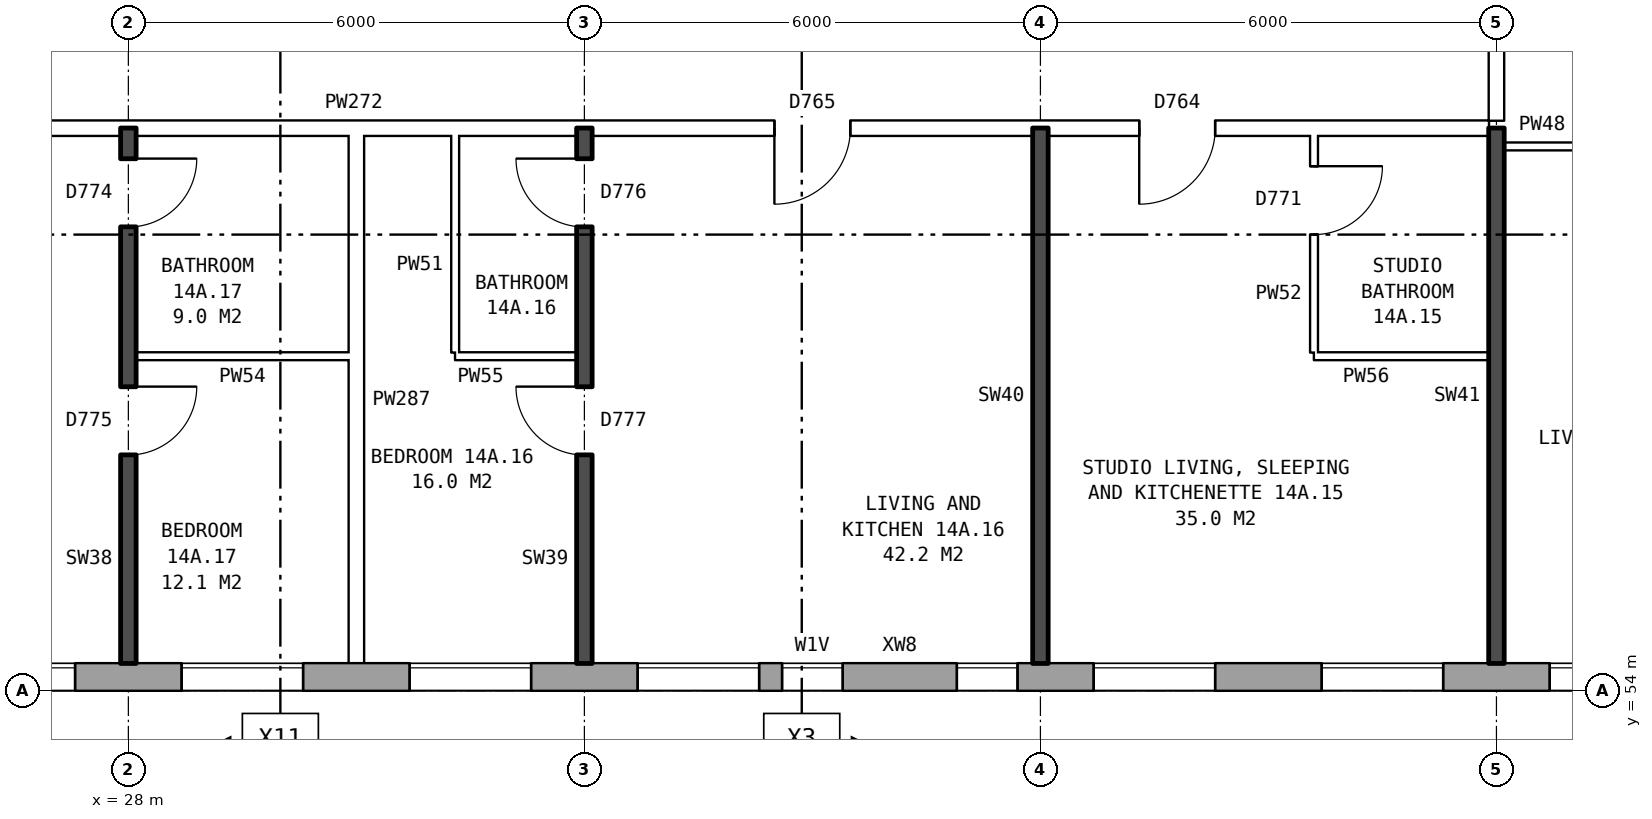
"""IFC4 building model, lengths in metres.
Left out: names, types, materials, properties, quantities, classifications, styles, units other than length and angle.
Written with IfcOpenShell. Run it as: python <this file> out.ifc"""

import sys

from ifc_helpers import new_model, si_unit, direction, frame, frame_2d, origin, place, context, subcontext, project, spatial, rectangle, extrude, element, fill, save


model = new_model("IFC4")
c1 = context("Model", 3, precision=1e-05, world=origin(), true_north=direction((0.0, 1.0)))
c2 = subcontext(c1, "Body", "Model", "MODEL_VIEW")
j1 = project(units=[si_unit("LENGTHUNIT", "METRE"), si_unit("PLANEANGLEUNIT", "RADIAN")], contexts=[c1])
p1 = place(None, origin())
s1 = spatial("IfcSite", under=j1, at=p1, CompositionType="ELEMENT")
p2 = place(p1, origin())
s2 = spatial("IfcBuilding", under=s1, at=p2, CompositionType="ELEMENT")
p3 = place(p2, frame((0.0, 0.0, 53.6)))
s3 = spatial("IfcBuildingStorey", under=s2, at=p3, CompositionType="ELEMENT", Elevation=53.6)
p4 = place(p3, frame((24.575, 54.18, 0.0), z_axis=(0.0, 0.0, 1.0), x_axis=(1.0, 0.0, 0.0)))
e1 = element("IfcWall", 1, at=p4, inside=s3, PredefinedType="STANDARD", context=c2, shape_type="SweptSolid", body=[
    extrude(rectangle(XDim=48.351, YDim=0.36, at=frame_2d((24.175, 0.0))), origin(), (0.0, 0.0, 1.0), 2.85),
])
p5 = place(p4, frame((1.125, 0.0, 0.8)))
e2 = element("IfcOpeningElement", 2, at=p5, cuts=e1, PredefinedType="OPENING", context=c2, shape_type="SweptSolid", body=[
    extrude(rectangle(XDim=1.6, YDim=1.8, at=frame_2d((0.8, 0.9))), frame((0.0, 0.19, 0.0), z_axis=(0.0, -1.0, 0.0), x_axis=(1.0, 0.0, 0.0)), (0.0, 0.0, 1.0), 0.38),
])
p6 = place(p4, frame((4.125, 0.0, 0.8)))
e3 = element("IfcOpeningElement", 3, at=p6, cuts=e1, PredefinedType="OPENING", context=c2, shape_type="SweptSolid", body=[
    extrude(rectangle(XDim=1.6, YDim=1.8, at=frame_2d((0.8, 0.9))), frame((0.0, 0.19, 0.0), z_axis=(0.0, -1.0, 0.0), x_axis=(1.0, 0.0, 0.0)), (0.0, 0.0, 1.0), 0.38),
])
p7 = place(p4, frame((7.125, 0.0, 0.8)))
e4 = element("IfcOpeningElement", 4, at=p7, cuts=e1, PredefinedType="OPENING", context=c2, shape_type="SweptSolid", body=[
    extrude(rectangle(XDim=1.6, YDim=1.8, at=frame_2d((0.8, 0.9))), frame((0.0, 0.19, 0.0), z_axis=(0.0, -1.0, 0.0), x_axis=(1.0, 0.0, 0.0)), (0.0, 0.0, 1.0), 0.38),
])
p8 = place(p4, frame((10.125, 0.0, 0.8)))
e5 = element("IfcOpeningElement", 5, at=p8, cuts=e1, PredefinedType="OPENING", context=c2, shape_type="SweptSolid", body=[
    extrude(rectangle(XDim=1.6, YDim=1.8, at=frame_2d((0.8, 0.9))), frame((0.0, 0.19, 0.0), z_axis=(0.0, -1.0, 0.0), x_axis=(1.0, 0.0, 0.0)), (0.0, 0.0, 1.0), 0.38),
])
p9 = place(p4, frame((12.025, 0.0, 1.7)))
e6 = element("IfcOpeningElement", 6, at=p9, cuts=e1, PredefinedType="OPENING", context=c2, shape_type="SweptSolid", body=[
    extrude(rectangle(XDim=0.8, YDim=0.9, at=frame_2d((0.4, 0.45))), frame((0.0, 0.19, 0.0), z_axis=(0.0, -1.0, 0.0), x_axis=(1.0, 0.0, 0.0)), (0.0, 0.0, 1.0), 0.38),
])
p10 = place(p4, frame((16.125, 0.0, 0.8)))
e7 = element("IfcOpeningElement", 7, at=p10, cuts=e1, PredefinedType="OPENING", context=c2, shape_type="SweptSolid", body=[
    extrude(rectangle(XDim=1.6, YDim=1.8, at=frame_2d((0.8, 0.9))), frame((0.0, 0.19, 0.0), z_axis=(0.0, -1.0, 0.0), x_axis=(1.0, 0.0, 0.0)), (0.0, 0.0, 1.0), 0.38),
])
p11 = place(p4, frame((19.125, 0.0, 0.8)))
e8 = element("IfcOpeningElement", 8, at=p11, cuts=e1, PredefinedType="OPENING", context=c2, shape_type="SweptSolid", body=[
    extrude(rectangle(XDim=1.6, YDim=1.8, at=frame_2d((0.8, 0.9))), frame((0.0, 0.19, 0.0), z_axis=(0.0, -1.0, 0.0), x_axis=(1.0, 0.0, 0.0)), (0.0, 0.0, 1.0), 0.38),
])
p12 = place(p4, frame((22.125, 0.0, 0.8)))
e9 = element("IfcOpeningElement", 9, at=p12, cuts=e1, PredefinedType="OPENING", context=c2, shape_type="SweptSolid", body=[
    extrude(rectangle(XDim=1.6, YDim=1.8, at=frame_2d((0.8, 0.9))), frame((0.0, 0.19, 0.0), z_axis=(0.0, -1.0, 0.0), x_axis=(1.0, 0.0, 0.0)), (0.0, 0.0, 1.0), 0.38),
])
p13 = place(p4, frame((25.125, 0.0, 0.8)))
e10 = element("IfcOpeningElement", 10, at=p13, cuts=e1, PredefinedType="OPENING", context=c2, shape_type="SweptSolid", body=[
    extrude(rectangle(XDim=1.6, YDim=1.8, at=frame_2d((0.8, 0.9))), frame((0.0, 0.19, 0.0), z_axis=(0.0, -1.0, 0.0), x_axis=(1.0, 0.0, 0.0)), (0.0, 0.0, 1.0), 0.38),
])
p14 = place(p4, frame((28.125, 0.0, 0.8)))
e11 = element("IfcOpeningElement", 11, at=p14, cuts=e1, PredefinedType="OPENING", context=c2, shape_type="SweptSolid", body=[
    extrude(rectangle(XDim=1.6, YDim=1.8, at=frame_2d((0.8, 0.9))), frame((0.0, 0.19, 0.0), z_axis=(0.0, -1.0, 0.0), x_axis=(1.0, 0.0, 0.0)), (0.0, 0.0, 1.0), 0.38),
])
p15 = place(p4, frame((31.125, 0.0, 0.8)))
e12 = element("IfcOpeningElement", 12, at=p15, cuts=e1, PredefinedType="OPENING", context=c2, shape_type="SweptSolid", body=[
    extrude(rectangle(XDim=1.6, YDim=1.8, at=frame_2d((0.8, 0.9))), frame((0.0, 0.19, 0.0), z_axis=(0.0, -1.0, 0.0), x_axis=(1.0, 0.0, 0.0)), (0.0, 0.0, 1.0), 0.38),
])
p16 = place(p4, frame((33.625, 0.0, 0.15)))
e13 = element("IfcOpeningElement", 13, at=p16, cuts=e1, PredefinedType="OPENING", context=c2, shape_type="SweptSolid", body=[
    extrude(rectangle(XDim=1.4, YDim=0.9, at=frame_2d((0.7, 0.45))), frame((0.0, 0.19, 0.0), z_axis=(0.0, -1.0, 0.0), x_axis=(1.0, 0.0, 0.0)), (0.0, 0.0, 1.0), 0.38),
])
p17 = place(p4, frame((37.125, 0.0, 0.8)))
e14 = element("IfcOpeningElement", 14, at=p17, cuts=e1, PredefinedType="OPENING", context=c2, shape_type="SweptSolid", body=[
    extrude(rectangle(XDim=1.6, YDim=1.8, at=frame_2d((0.8, 0.9))), frame((0.0, 0.19, 0.0), z_axis=(0.0, -1.0, 0.0), x_axis=(1.0, 0.0, 0.0)), (0.0, 0.0, 1.0), 0.38),
])
p18 = place(p4, frame((40.125, 0.0, 0.8)))
e15 = element("IfcOpeningElement", 15, at=p18, cuts=e1, PredefinedType="OPENING", context=c2, shape_type="SweptSolid", body=[
    extrude(rectangle(XDim=1.6, YDim=1.8, at=frame_2d((0.8, 0.9))), frame((0.0, 0.19, 0.0), z_axis=(0.0, -1.0, 0.0), x_axis=(1.0, 0.0, 0.0)), (0.0, 0.0, 1.0), 0.38),
])
p19 = place(p4, frame((43.125, 0.0, 0.8)))
e16 = element("IfcOpeningElement", 16, at=p19, cuts=e1, PredefinedType="OPENING", context=c2, shape_type="SweptSolid", body=[
    extrude(rectangle(XDim=1.6, YDim=1.8, at=frame_2d((0.8, 0.9))), frame((0.0, 0.19, 0.0), z_axis=(0.0, -1.0, 0.0), x_axis=(1.0, 0.0, 0.0)), (0.0, 0.0, 1.0), 0.38),
])
p20 = place(p4, frame((46.125, 0.0, 0.8)))
e17 = element("IfcOpeningElement", 17, at=p20, cuts=e1, PredefinedType="OPENING", context=c2, shape_type="SweptSolid", body=[
    extrude(rectangle(XDim=1.6, YDim=1.8, at=frame_2d((0.8, 0.9))), frame((0.0, 0.19, 0.0), z_axis=(0.0, -1.0, 0.0), x_axis=(1.0, 0.0, 0.0)), (0.0, 0.0, 1.0), 0.38),
])
p21 = place(p4, frame((14.325, 0.0, 0.8)))
e18 = element("IfcOpeningElement", 18, at=p21, cuts=e1, PredefinedType="OPENING", context=c2, shape_type="SweptSolid", body=[
    extrude(rectangle(XDim=0.8, YDim=0.9, at=frame_2d((0.4, 0.45))), frame((0.0, 0.19, 0.0), z_axis=(0.0, -1.0, 0.0), x_axis=(1.0, 0.0, 0.0)), (0.0, 0.0, 1.0), 0.38),
])
p22 = place(p4, frame((35.525, 0.0, 1.65)))
e19 = element("IfcOpeningElement", 19, at=p22, cuts=e1, PredefinedType="OPENING", context=c2, shape_type="SweptSolid", body=[
    extrude(rectangle(XDim=0.6, YDim=0.9, at=frame_2d((0.3, 0.45))), frame((0.0, 0.19, 0.0), z_axis=(0.0, -1.0, 0.0), x_axis=(1.0, 0.0, 0.0)), (0.0, 0.0, 1.0), 0.38),
])
p23 = place(p3, frame((28.1, 58.4, 0.0), z_axis=(0.0, 0.0, 1.0), x_axis=(1.0, 0.0, 0.0)))
e20 = element("IfcWall", 20, at=p23, inside=s3, PredefinedType="PARTITIONING", context=c2, shape_type="SweptSolid", body=[
    extrude(rectangle(XDim=2.8, YDim=0.1, at=frame_2d((1.4, 0.0))), origin(), (0.0, 0.0, 1.0), 2.85),
])
p24 = place(p3, frame((32.3, 58.4, 0.0), z_axis=(0.0, 0.0, 1.0), x_axis=(1.0, 0.0, 0.0)))
e21 = element("IfcWall", 21, at=p24, inside=s3, PredefinedType="PARTITIONING", context=c2, shape_type="SweptSolid", body=[
    extrude(rectangle(XDim=1.6, YDim=0.1, at=frame_2d((0.8, 0.0))), origin(), (0.0, 0.0, 1.0), 2.85),
])
p25 = place(p3, frame((43.6, 58.4, 0.0), z_axis=(0.0, 0.0, 1.0), x_axis=(1.0, 0.0, 0.0)))
e22 = element("IfcWall", 22, at=p25, inside=s3, PredefinedType="PARTITIONING", context=c2, shape_type="SweptSolid", body=[
    extrude(rectangle(XDim=2.3, YDim=0.1, at=frame_2d((1.15, 0.0))), origin(), (0.0, 0.0, 1.0), 2.85),
])
p26 = place(p3, frame((46.1, 61.16, 0.0), z_axis=(0.0, 0.0, 1.0), x_axis=(1.0, 0.0, 0.0)))
e23 = element("IfcWall", 23, at=p26, inside=s3, PredefinedType="PARTITIONING", context=c2, shape_type="SweptSolid", body=[
    extrude(rectangle(XDim=2.9, YDim=0.1, at=frame_2d((1.45, 0.0))), origin(), (0.0, 0.0, 1.0), 2.85),
])
p27 = place(p26, frame((1.0, 0.0, 0.0)))
e24 = element("IfcOpeningElement", 24, at=p27, cuts=e23, PredefinedType="OPENING", context=c2, shape_type="SweptSolid", body=[
    extrude(rectangle(XDim=0.9, YDim=2.1, at=frame_2d((0.45, 1.05))), frame((0.0, 0.06, 0.0), z_axis=(0.0, -1.0, 0.0), x_axis=(1.0, 0.0, 0.0)), (0.0, 0.0, 1.0), 0.12),
])
p28 = place(p3, frame((21.86, 61.4, 0.0), z_axis=(0.0, 0.0, 1.0), x_axis=(1.0, 0.0, 0.0)))
e25 = element("IfcWall", 25, at=p28, inside=s3, PredefinedType="PARTITIONING", context=c2, shape_type="SweptSolid", body=[
    extrude(rectangle(XDim=24.04, YDim=0.2, at=frame_2d((12.02, 0.0))), origin(), (0.0, 0.0, 1.0), 2.85),
])
p29 = place(p28, frame((19.44, 0.0, 0.0)))
e26 = element("IfcOpeningElement", 26, at=p29, cuts=e25, PredefinedType="OPENING", context=c2, shape_type="SweptSolid", body=[
    extrude(rectangle(XDim=1.0, YDim=2.1, at=frame_2d((0.5, 1.05))), frame((0.0, 0.11, 0.0), z_axis=(0.0, -1.0, 0.0), x_axis=(1.0, 0.0, 0.0)), (0.0, 0.0, 1.0), 0.22),
])
p30 = place(p28, frame((14.64, 0.0, 0.0)))
e27 = element("IfcOpeningElement", 27, at=p30, cuts=e25, PredefinedType="OPENING", context=c2, shape_type="SweptSolid", body=[
    extrude(rectangle(XDim=1.0, YDim=2.1, at=frame_2d((0.5, 1.05))), frame((0.0, 0.11, 0.0), z_axis=(0.0, -1.0, 0.0), x_axis=(1.0, 0.0, 0.0)), (0.0, 0.0, 1.0), 0.22),
])
p31 = place(p28, frame((2.57, 0.0, 0.0)))
e28 = element("IfcOpeningElement", 28, at=p31, cuts=e25, PredefinedType="OPENING", context=c2, shape_type="SweptSolid", body=[
    extrude(rectangle(XDim=1.0, YDim=2.1, at=frame_2d((0.5, 1.05))), frame((0.0, 0.11, 0.0), z_axis=(0.0, -1.0, 0.0), x_axis=(1.0, 0.0, 0.0)), (0.0, 0.0, 1.0), 0.22),
])
p32 = place(p3, frame((28.0, 54.36, 0.0), z_axis=(0.0, 0.0, 1.0), x_axis=(0.0, 1.0, 0.0)))
e29 = element("IfcWall", 29, at=p32, inside=s3, PredefinedType="SOLIDWALL", context=c2, shape_type="SweptSolid", body=[
    extrude(rectangle(XDim=7.04, YDim=0.2, at=frame_2d((3.52, 0.0))), origin(), (0.0, 0.0, 1.0), 2.85),
])
p33 = place(p32, frame((2.74, 0.0, 0.0)))
e30 = element("IfcOpeningElement", 30, at=p33, cuts=e29, PredefinedType="OPENING", context=c2, shape_type="SweptSolid", body=[
    extrude(rectangle(XDim=0.9, YDim=2.1, at=frame_2d((0.45, 1.05))), frame((0.0, 0.11, 0.0), z_axis=(0.0, -1.0, 0.0), x_axis=(1.0, 0.0, 0.0)), (0.0, 0.0, 1.0), 0.22),
])
p34 = place(p32, frame((5.74, 0.0, 0.0)))
e31 = element("IfcOpeningElement", 31, at=p34, cuts=e29, PredefinedType="OPENING", context=c2, shape_type="SweptSolid", body=[
    extrude(rectangle(XDim=0.9, YDim=2.1, at=frame_2d((0.45, 1.05))), frame((0.0, 0.11, 0.0), z_axis=(0.0, -1.0, 0.0), x_axis=(1.0, 0.0, 0.0)), (0.0, 0.0, 1.0), 0.22),
])
p35 = place(p3, frame((31.0, 54.36, 0.0), z_axis=(0.0, 0.0, 1.0), x_axis=(0.0, 1.0, 0.0)))
e32 = element("IfcWall", 32, at=p35, inside=s3, PredefinedType="PARTITIONING", context=c2, shape_type="SweptSolid", body=[
    extrude(rectangle(XDim=6.94, YDim=0.2, at=frame_2d((3.47, 0.0))), origin(), (0.0, 0.0, 1.0), 2.85),
])
p36 = place(p3, frame((32.3, 58.45, 0.0), z_axis=(0.0, 0.0, 1.0), x_axis=(0.0, 1.0, 0.0)))
e33 = element("IfcWall", 33, at=p36, inside=s3, PredefinedType="PARTITIONING", context=c2, shape_type="SweptSolid", body=[
    extrude(rectangle(XDim=2.85, YDim=0.1, at=frame_2d((1.425, 0.0))), origin(), (0.0, 0.0, 1.0), 2.85),
])
p37 = place(p3, frame((34.0, 54.36, 0.0), z_axis=(0.0, 0.0, 1.0), x_axis=(0.0, 1.0, 0.0)))
e34 = element("IfcWall", 34, at=p37, inside=s3, PredefinedType="SOLIDWALL", context=c2, shape_type="SweptSolid", body=[
    extrude(rectangle(XDim=7.04, YDim=0.2, at=frame_2d((3.52, 0.0))), origin(), (0.0, 0.0, 1.0), 2.85),
])
p38 = place(p37, frame((2.74, 0.0, 0.0)))
e35 = element("IfcOpeningElement", 35, at=p38, cuts=e34, PredefinedType="OPENING", context=c2, shape_type="SweptSolid", body=[
    extrude(rectangle(XDim=0.9, YDim=2.1, at=frame_2d((0.45, 1.05))), frame((0.0, 0.11, 0.0), z_axis=(0.0, -1.0, 0.0), x_axis=(1.0, 0.0, 0.0)), (0.0, 0.0, 1.0), 0.22),
])
p39 = place(p37, frame((5.74, 0.0, 0.0)))
e36 = element("IfcOpeningElement", 36, at=p39, cuts=e34, PredefinedType="OPENING", context=c2, shape_type="SweptSolid", body=[
    extrude(rectangle(XDim=0.9, YDim=2.1, at=frame_2d((0.45, 1.05))), frame((0.0, 0.11, 0.0), z_axis=(0.0, -1.0, 0.0), x_axis=(1.0, 0.0, 0.0)), (0.0, 0.0, 1.0), 0.22),
])
p40 = place(p3, frame((40.0, 54.36, 0.0), z_axis=(0.0, 0.0, 1.0), x_axis=(0.0, 1.0, 0.0)))
e37 = element("IfcWall", 37, at=p40, inside=s3, PredefinedType="SOLIDWALL", context=c2, shape_type="SweptSolid", body=[
    extrude(rectangle(XDim=7.04, YDim=0.2, at=frame_2d((3.52, 0.0))), origin(), (0.0, 0.0, 1.0), 2.85),
])
p41 = place(p3, frame((43.6, 58.45, 0.0), z_axis=(0.0, 0.0, 1.0), x_axis=(0.0, 1.0, 0.0)))
e38 = element("IfcWall", 38, at=p41, inside=s3, PredefinedType="PARTITIONING", context=c2, shape_type="SweptSolid", body=[
    extrude(rectangle(XDim=2.85, YDim=0.1, at=frame_2d((1.425, 0.0))), origin(), (0.0, 0.0, 1.0), 2.85),
])
p42 = place(p41, frame((1.55, 0.0, 0.0)))
e39 = element("IfcOpeningElement", 39, at=p42, cuts=e38, PredefinedType="OPENING", context=c2, shape_type="SweptSolid", body=[
    extrude(rectangle(XDim=0.9, YDim=2.1, at=frame_2d((0.45, 1.05))), frame((0.0, 0.06, 0.0), z_axis=(0.0, -1.0, 0.0), x_axis=(1.0, 0.0, 0.0)), (0.0, 0.0, 1.0), 0.12),
])
p43 = place(p3, frame((46.0, 54.36, 0.0), z_axis=(0.0, 0.0, 1.0), x_axis=(0.0, 1.0, 0.0)))
e40 = element("IfcWall", 40, at=p43, inside=s3, PredefinedType="SOLIDWALL", context=c2, shape_type="SweptSolid", body=[
    extrude(rectangle(XDim=7.04, YDim=0.2, at=frame_2d((3.52, 0.0))), origin(), (0.0, 0.0, 1.0), 2.85),
])
p44 = place(p3, frame((46.0, 61.5, 0.0), z_axis=(0.0, 0.0, 1.0), x_axis=(0.0, 1.0, 0.0)))
e41 = element("IfcWall", 41, at=p44, inside=s3, PredefinedType="PARTITIONING", context=c2, shape_type="SweptSolid", body=[
    extrude(rectangle(XDim=2.2, YDim=0.2, at=frame_2d((1.1, 0.0))), origin(), (0.0, 0.0, 1.0), 2.85),
])
p45 = place(p5, origin())
e42 = element("IfcWindow", 42, at=p45, inside=s3, PartitioningType="SINGLE_PANEL", PredefinedType="WINDOW", context=c2, shape_type="SweptSolid", body=[
    extrude(rectangle(XDim=1.6, YDim=1.8, at=frame_2d((0.8, 0.9))), frame((0.0, 0.15, 0.0), z_axis=(0.0, -1.0, 0.0), x_axis=(1.0, 0.0, 0.0)), (0.0, 0.0, 1.0), 0.06),
])
fill(e2, e42)
p46 = place(p6, origin())
e43 = element("IfcWindow", 43, at=p46, inside=s3, PartitioningType="SINGLE_PANEL", PredefinedType="WINDOW", context=c2, shape_type="SweptSolid", body=[
    extrude(rectangle(XDim=1.6, YDim=1.8, at=frame_2d((0.8, 0.9))), frame((0.0, 0.15, 0.0), z_axis=(0.0, -1.0, 0.0), x_axis=(1.0, 0.0, 0.0)), (0.0, 0.0, 1.0), 0.06),
])
fill(e3, e43)
p47 = place(p7, origin())
e44 = element("IfcWindow", 44, at=p47, inside=s3, PartitioningType="SINGLE_PANEL", PredefinedType="WINDOW", context=c2, shape_type="SweptSolid", body=[
    extrude(rectangle(XDim=1.6, YDim=1.8, at=frame_2d((0.8, 0.9))), frame((0.0, 0.15, 0.0), z_axis=(0.0, -1.0, 0.0), x_axis=(1.0, 0.0, 0.0)), (0.0, 0.0, 1.0), 0.06),
])
fill(e4, e44)
p48 = place(p8, origin())
e45 = element("IfcWindow", 45, at=p48, inside=s3, PartitioningType="SINGLE_PANEL", PredefinedType="WINDOW", context=c2, shape_type="SweptSolid", body=[
    extrude(rectangle(XDim=1.6, YDim=1.8, at=frame_2d((0.8, 0.9))), frame((0.0, 0.15, 0.0), z_axis=(0.0, -1.0, 0.0), x_axis=(1.0, 0.0, 0.0)), (0.0, 0.0, 1.0), 0.06),
])
fill(e5, e45)
p49 = place(p9, origin())
e46 = element("IfcWindow", 46, at=p49, inside=s3, PartitioningType="SINGLE_PANEL", PredefinedType="WINDOW", context=c2, shape_type="SweptSolid", body=[
    extrude(rectangle(XDim=0.8, YDim=0.9, at=frame_2d((0.4, 0.45))), frame((0.0, 0.15, 0.0), z_axis=(0.0, -1.0, 0.0), x_axis=(1.0, 0.0, 0.0)), (0.0, 0.0, 1.0), 0.06),
])
fill(e6, e46)
p50 = place(p10, origin())
e47 = element("IfcWindow", 47, at=p50, inside=s3, PartitioningType="SINGLE_PANEL", PredefinedType="WINDOW", context=c2, shape_type="SweptSolid", body=[
    extrude(rectangle(XDim=1.6, YDim=1.8, at=frame_2d((0.8, 0.9))), frame((0.0, 0.15, 0.0), z_axis=(0.0, -1.0, 0.0), x_axis=(1.0, 0.0, 0.0)), (0.0, 0.0, 1.0), 0.06),
])
fill(e7, e47)
p51 = place(p11, origin())
e48 = element("IfcWindow", 48, at=p51, inside=s3, PartitioningType="SINGLE_PANEL", PredefinedType="WINDOW", context=c2, shape_type="SweptSolid", body=[
    extrude(rectangle(XDim=1.6, YDim=1.8, at=frame_2d((0.8, 0.9))), frame((0.0, 0.15, 0.0), z_axis=(0.0, -1.0, 0.0), x_axis=(1.0, 0.0, 0.0)), (0.0, 0.0, 1.0), 0.06),
])
fill(e8, e48)
p52 = place(p12, origin())
e49 = element("IfcWindow", 49, at=p52, inside=s3, PartitioningType="SINGLE_PANEL", PredefinedType="WINDOW", context=c2, shape_type="SweptSolid", body=[
    extrude(rectangle(XDim=1.6, YDim=1.8, at=frame_2d((0.8, 0.9))), frame((0.0, 0.15, 0.0), z_axis=(0.0, -1.0, 0.0), x_axis=(1.0, 0.0, 0.0)), (0.0, 0.0, 1.0), 0.06),
])
fill(e9, e49)
p53 = place(p29, frame((1.0, 0.0, 0.0), z_axis=(0.0, 0.0, 1.0), x_axis=(-1.0, 0.0, 0.0)))
e50 = element("IfcDoor", 50, at=p53, inside=s3, OperationType="SINGLE_SWING_RIGHT", PredefinedType="DOOR", context=c2, shape_type="SweptSolid", body=[
    extrude(rectangle(XDim=1.0, YDim=2.1, at=frame_2d((0.5, 1.05))), frame((0.0, 0.025, 0.0), z_axis=(0.0, -1.0, 0.0), x_axis=(1.0, 0.0, 0.0)), (0.0, 0.0, 1.0), 0.05),
])
fill(e26, e50)
p54 = place(p42, frame((0.9, 0.0, 0.0), z_axis=(0.0, 0.0, 1.0), x_axis=(-1.0, 0.0, 0.0)))
e51 = element("IfcDoor", 51, at=p54, inside=s3, OperationType="SINGLE_SWING_LEFT", PredefinedType="DOOR", context=c2, shape_type="SweptSolid", body=[
    extrude(rectangle(XDim=0.9, YDim=2.1, at=frame_2d((0.45, 1.05))), frame((0.0, 0.025, 0.0), z_axis=(0.0, -1.0, 0.0), x_axis=(1.0, 0.0, 0.0)), (0.0, 0.0, 1.0), 0.05),
])
fill(e39, e51)
p55 = place(p38, origin())
e52 = element("IfcDoor", 52, at=p55, inside=s3, OperationType="SINGLE_SWING_RIGHT", PredefinedType="DOOR", context=c2, shape_type="SweptSolid", body=[
    extrude(rectangle(XDim=0.9, YDim=2.1, at=frame_2d((0.45, 1.05))), frame((0.0, 0.025, 0.0), z_axis=(0.0, -1.0, 0.0), x_axis=(1.0, 0.0, 0.0)), (0.0, 0.0, 1.0), 0.05),
])
fill(e35, e52)
p56 = place(p30, frame((1.0, 0.0, 0.0), z_axis=(0.0, 0.0, 1.0), x_axis=(-1.0, 0.0, 0.0)))
e53 = element("IfcDoor", 53, at=p56, inside=s3, OperationType="SINGLE_SWING_RIGHT", PredefinedType="DOOR", context=c2, shape_type="SweptSolid", body=[
    extrude(rectangle(XDim=1.0, YDim=2.1, at=frame_2d((0.5, 1.05))), frame((0.0, 0.025, 0.0), z_axis=(0.0, -1.0, 0.0), x_axis=(1.0, 0.0, 0.0)), (0.0, 0.0, 1.0), 0.05),
])
fill(e27, e53)
p57 = place(p39, origin())
e54 = element("IfcDoor", 54, at=p57, inside=s3, OperationType="SINGLE_SWING_RIGHT", PredefinedType="DOOR", context=c2, shape_type="SweptSolid", body=[
    extrude(rectangle(XDim=0.9, YDim=2.1, at=frame_2d((0.45, 1.05))), frame((0.0, 0.025, 0.0), z_axis=(0.0, -1.0, 0.0), x_axis=(1.0, 0.0, 0.0)), (0.0, 0.0, 1.0), 0.05),
])
fill(e36, e54)
p58 = place(p33, frame((0.9, 0.0, 0.0), z_axis=(0.0, 0.0, 1.0), x_axis=(-1.0, 0.0, 0.0)))
e55 = element("IfcDoor", 55, at=p58, inside=s3, OperationType="SINGLE_SWING_LEFT", PredefinedType="DOOR", context=c2, shape_type="SweptSolid", body=[
    extrude(rectangle(XDim=0.9, YDim=2.1, at=frame_2d((0.45, 1.05))), frame((0.0, 0.025, 0.0), z_axis=(0.0, -1.0, 0.0), x_axis=(1.0, 0.0, 0.0)), (0.0, 0.0, 1.0), 0.05),
])
fill(e30, e55)
p59 = place(p34, frame((0.9, 0.0, 0.0), z_axis=(0.0, 0.0, 1.0), x_axis=(-1.0, 0.0, 0.0)))
e56 = element("IfcDoor", 56, at=p59, inside=s3, OperationType="SINGLE_SWING_LEFT", PredefinedType="DOOR", context=c2, shape_type="SweptSolid", body=[
    extrude(rectangle(XDim=0.9, YDim=2.1, at=frame_2d((0.45, 1.05))), frame((0.0, 0.025, 0.0), z_axis=(0.0, -1.0, 0.0), x_axis=(1.0, 0.0, 0.0)), (0.0, 0.0, 1.0), 0.05),
])
fill(e31, e56)
p60 = place(p21, origin())
e57 = element("IfcWindow", 57, at=p60, inside=s3, PartitioningType="SINGLE_PANEL", PredefinedType="WINDOW", context=c2, shape_type="SweptSolid", body=[
    extrude(rectangle(XDim=0.8, YDim=0.9, at=frame_2d((0.4, 0.45))), frame((0.0, 0.15, 0.0), z_axis=(0.0, -1.0, 0.0), x_axis=(1.0, 0.0, 0.0)), (0.0, 0.0, 1.0), 0.06),
])
fill(e18, e57)
save(model, sys.argv[1])
